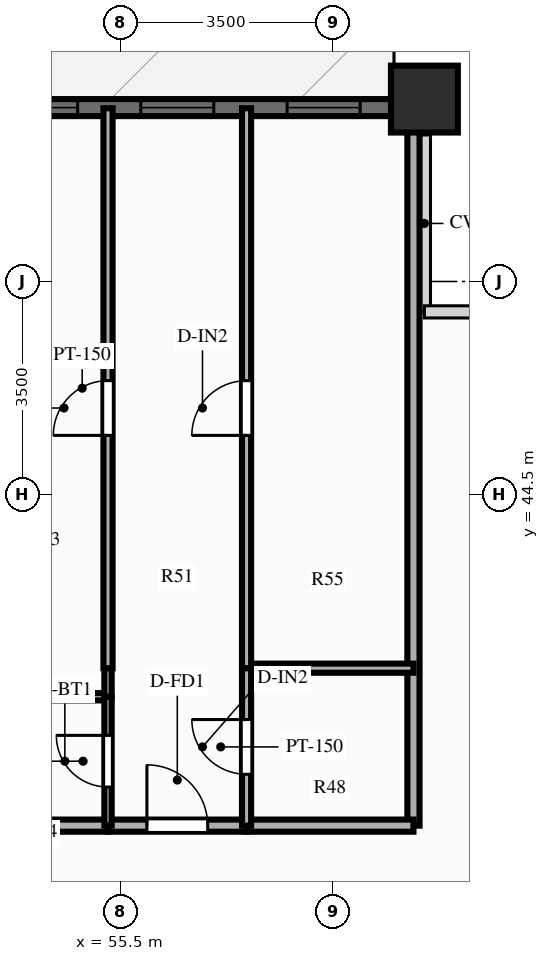
"""IFC4 building model, lengths in metres.
Left out: names, types, materials, properties, quantities, classifications, styles, units other than length and angle.
Written with IfcOpenShell. Run it as: python <this file> out.ifc"""

import sys

from ifc_helpers import new_model, si_unit, direction, frame, frame_2d, origin, origin_2d, place, context, subcontext, project, spatial, rectangle, extrude, source, transform, mapped, element, fill, save


model = new_model("IFC4")
c1 = context("Model", 3, precision=1e-05, world=origin(), true_north=direction((0.0, 1.0)))
c2 = subcontext(c1, "Body", "Model", "MODEL_VIEW")
j1 = project(units=[si_unit("LENGTHUNIT", "METRE"), si_unit("PLANEANGLEUNIT", "RADIAN")], contexts=[c1])
p1 = place(None, origin())
s1 = spatial("IfcSite", under=j1, at=p1, CompositionType="ELEMENT")
p2 = place(p1, origin())
s2 = spatial("IfcBuilding", under=s1, at=p2, CompositionType="ELEMENT")
p3 = place(p2, frame((0.0, 0.0, 25.4)))
s3 = spatial("IfcBuildingStorey", under=s2, at=p3, CompositionType="ELEMENT", Elevation=25.4)
m1 = source(origin(), c2, "Body", "SweptSolid", [
    extrude(rectangle(XDim=1.1, YDim=1.1, at=origin_2d()), origin(), (0.0, 0.0, 1.0), 3.0),
])
p4 = place(p3, frame((60.5, 51.0, 0.0), z_axis=(0.0, 0.0, 1.0), x_axis=(1.0, 0.0, 0.0)))
e1 = element("IfcColumn", 1, at=p4, inside=s3, PredefinedType="COLUMN", context=c2, shape_type="MappedRepresentation", body=[
    mapped(m1, transform((0.0, 0.0, 0.0), scale=1.0)),
])
p5 = place(p3, frame((15.5, 50.86, 0.0), z_axis=(0.0, 0.0, 1.0), x_axis=(1.0, 0.0, 0.0)))
e2 = element("IfcWall", 2, at=p5, inside=s3, PredefinedType="SOLIDWALL", context=c2, shape_type="SweptSolid", body=[
    extrude(rectangle(XDim=45.0, YDim=0.28, at=frame_2d((22.5, 0.0))), origin(), (0.0, 0.0, 1.0), 2.28),
])
p6 = place(p5, frame((0.76, 0.0, 0.25)))
e3 = element("IfcOpeningElement", 3, at=p6, cuts=e2, PredefinedType="OPENING", context=c2, shape_type="SweptSolid", body=[
    extrude(rectangle(XDim=1.2, YDim=1.5, at=frame_2d((0.6, 0.75))), frame((0.0, 0.152, 0.0), z_axis=(0.0, -1.0, 0.0), x_axis=(1.0, 0.0, 0.0)), (0.0, 0.0, 1.0), 0.304),
])
p7 = place(p5, frame((3.494, 0.0, 0.25)))
e4 = element("IfcOpeningElement", 4, at=p7, cuts=e2, PredefinedType="OPENING", context=c2, shape_type="SweptSolid", body=[
    extrude(rectangle(XDim=1.2, YDim=1.5, at=frame_2d((0.6, 0.75))), frame((0.0, 0.152, 0.0), z_axis=(0.0, -1.0, 0.0), x_axis=(1.0, 0.0, 0.0)), (0.0, 0.0, 1.0), 0.304),
])
p8 = place(p5, frame((8.741, 0.0, 0.25)))
e5 = element("IfcOpeningElement", 5, at=p8, cuts=e2, PredefinedType="OPENING", context=c2, shape_type="SweptSolid", body=[
    extrude(rectangle(XDim=1.2, YDim=1.5, at=frame_2d((0.6, 0.75))), frame((0.0, 0.152, 0.0), z_axis=(0.0, -1.0, 0.0), x_axis=(1.0, 0.0, 0.0)), (0.0, 0.0, 1.0), 0.304),
])
p9 = place(p5, frame((13.616, 0.0, 0.25)))
e6 = element("IfcOpeningElement", 6, at=p9, cuts=e2, PredefinedType="OPENING", context=c2, shape_type="SweptSolid", body=[
    extrude(rectangle(XDim=1.2, YDim=1.5, at=frame_2d((0.6, 0.75))), frame((0.0, 0.152, 0.0), z_axis=(0.0, -1.0, 0.0), x_axis=(1.0, 0.0, 0.0)), (0.0, 0.0, 1.0), 0.304),
])
p10 = place(p5, frame((17.146, 0.0, 0.25)))
e7 = element("IfcOpeningElement", 7, at=p10, cuts=e2, PredefinedType="OPENING", context=c2, shape_type="SweptSolid", body=[
    extrude(rectangle(XDim=1.2, YDim=1.5, at=frame_2d((0.6, 0.75))), frame((0.0, 0.152, 0.0), z_axis=(0.0, -1.0, 0.0), x_axis=(1.0, 0.0, 0.0)), (0.0, 0.0, 1.0), 0.304),
])
p11 = place(p5, frame((22.423, 0.0, 0.0)))
e8 = element("IfcOpeningElement", 8, at=p11, cuts=e2, PredefinedType="OPENING", context=c2, shape_type="SweptSolid", body=[
    extrude(rectangle(XDim=1.1, YDim=2.15, at=frame_2d((0.55, 1.075))), frame((0.0, 0.152, 0.0), z_axis=(0.0, -1.0, 0.0), x_axis=(1.0, 0.0, 0.0)), (0.0, 0.0, 1.0), 0.304),
])
p12 = place(p5, frame((27.252, 0.0, 0.25)))
e9 = element("IfcOpeningElement", 9, at=p12, cuts=e2, PredefinedType="OPENING", context=c2, shape_type="SweptSolid", body=[
    extrude(rectangle(XDim=0.95, YDim=1.5, at=frame_2d((0.475, 0.75))), frame((0.0, 0.152, 0.0), z_axis=(0.0, -1.0, 0.0), x_axis=(1.0, 0.0, 0.0)), (0.0, 0.0, 1.0), 0.304),
])
p13 = place(p5, frame((30.873, 0.0, 0.25)))
e10 = element("IfcOpeningElement", 10, at=p13, cuts=e2, PredefinedType="OPENING", context=c2, shape_type="SweptSolid", body=[
    extrude(rectangle(XDim=1.2, YDim=1.5, at=frame_2d((0.6, 0.75))), frame((0.0, 0.152, 0.0), z_axis=(0.0, -1.0, 0.0), x_axis=(1.0, 0.0, 0.0)), (0.0, 0.0, 1.0), 0.304),
])
p14 = place(p5, frame((33.113, 0.0, 0.25)))
e11 = element("IfcOpeningElement", 11, at=p14, cuts=e2, PredefinedType="OPENING", context=c2, shape_type="SweptSolid", body=[
    extrude(rectangle(XDim=1.2, YDim=1.5, at=frame_2d((0.6, 0.75))), frame((0.0, 0.152, 0.0), z_axis=(0.0, -1.0, 0.0), x_axis=(1.0, 0.0, 0.0)), (0.0, 0.0, 1.0), 0.304),
])
p15 = place(p5, frame((35.624, 0.0, 0.25)))
e12 = element("IfcOpeningElement", 12, at=p15, cuts=e2, PredefinedType="OPENING", context=c2, shape_type="SweptSolid", body=[
    extrude(rectangle(XDim=1.2, YDim=1.5, at=frame_2d((0.6, 0.75))), frame((0.0, 0.152, 0.0), z_axis=(0.0, -1.0, 0.0), x_axis=(1.0, 0.0, 0.0)), (0.0, 0.0, 1.0), 0.304),
])
p16 = place(p5, frame((38.097, 0.0, 0.25)))
e13 = element("IfcOpeningElement", 13, at=p16, cuts=e2, PredefinedType="OPENING", context=c2, shape_type="SweptSolid", body=[
    extrude(rectangle(XDim=1.2, YDim=1.5, at=frame_2d((0.6, 0.75))), frame((0.0, 0.152, 0.0), z_axis=(0.0, -1.0, 0.0), x_axis=(1.0, 0.0, 0.0)), (0.0, 0.0, 1.0), 0.304),
])
p17 = place(p5, frame((40.336, 0.0, 0.25)))
e14 = element("IfcOpeningElement", 14, at=p17, cuts=e2, PredefinedType="OPENING", context=c2, shape_type="SweptSolid", body=[
    extrude(rectangle(XDim=1.2, YDim=1.5, at=frame_2d((0.6, 0.75))), frame((0.0, 0.152, 0.0), z_axis=(0.0, -1.0, 0.0), x_axis=(1.0, 0.0, 0.0)), (0.0, 0.0, 1.0), 0.304),
])
p18 = place(p5, frame((42.743, 0.0, 0.25)))
e15 = element("IfcOpeningElement", 15, at=p18, cuts=e2, PredefinedType="OPENING", context=c2, shape_type="SweptSolid", body=[
    extrude(rectangle(XDim=1.2, YDim=1.5, at=frame_2d((0.6, 0.75))), frame((0.0, 0.152, 0.0), z_axis=(0.0, -1.0, 0.0), x_axis=(1.0, 0.0, 0.0)), (0.0, 0.0, 1.0), 0.304),
])
p19 = place(p3, frame((60.32, 39.05, 0.0), z_axis=(0.0, 0.0, 1.0), x_axis=(0.0, 1.0, 0.0)))
e16 = element("IfcWall", 16, at=p19, inside=s3, PredefinedType="PARTITIONING", context=c2, shape_type="SweptSolid", body=[
    extrude(rectangle(XDim=11.8, YDim=0.2, at=frame_2d((5.9, 0.0))), origin(), (0.0, 0.0, 1.0), 2.79),
])
p20 = place(p3, frame((53.097, 39.05, 0.0), z_axis=(0.0, 0.0, 1.0), x_axis=(1.0, 0.0, 0.0)))
e17 = element("IfcWall", 17, at=p20, inside=s3, PredefinedType="PARTITIONING", context=c2, shape_type="SweptSolid", body=[
    extrude(rectangle(XDim=2.2, YDim=0.2, at=frame_2d((1.1, 0.0))), origin(), (0.0, 0.0, 1.0), 2.79),
])
p21 = place(p3, frame((55.297, 39.05, 0.0), z_axis=(0.0, 0.0, 1.0), x_axis=(1.0, 0.0, 0.0)))
e18 = element("IfcWall", 18, at=p21, inside=s3, PredefinedType="PARTITIONING", context=c2, shape_type="SweptSolid", body=[
    extrude(rectangle(XDim=2.279, YDim=0.2, at=frame_2d((1.139, 0.0))), origin(), (0.0, 0.0, 1.0), 2.79),
])
p22 = place(p21, frame((0.639, 0.0, 0.0)))
e19 = element("IfcOpeningElement", 19, at=p22, cuts=e18, PredefinedType="OPENING", context=c2, shape_type="SweptSolid", body=[
    extrude(rectangle(XDim=1.0, YDim=2.15, at=frame_2d((0.5, 1.075))), frame((0.0, 0.112, 0.0), z_axis=(0.0, -1.0, 0.0), x_axis=(1.0, 0.0, 0.0)), (0.0, 0.0, 1.0), 0.224),
])
p23 = place(p3, frame((57.575, 39.05, 0.0), z_axis=(0.0, 0.0, 1.0), x_axis=(1.0, 0.0, 0.0)))
e20 = element("IfcWall", 20, at=p23, inside=s3, PredefinedType="PARTITIONING", context=c2, shape_type="SweptSolid", body=[
    extrude(rectangle(XDim=2.745, YDim=0.2, at=frame_2d((1.373, 0.0))), origin(), (0.0, 0.0, 1.0), 2.79),
])
p24 = place(p3, frame((53.097, 41.17, 0.0), z_axis=(0.0, 0.0, 1.0), x_axis=(1.0, 0.0, 0.0)))
e21 = element("IfcWall", 21, at=p24, inside=s3, PredefinedType="PARTITIONING", context=c2, shape_type="SweptSolid", body=[
    extrude(rectangle(XDim=2.2, YDim=0.12, at=frame_2d((1.1, 0.0))), origin(), (0.0, 0.0, 1.0), 2.79),
])
p25 = place(p3, frame((57.575, 41.64, 0.0), z_axis=(0.0, 0.0, 1.0), x_axis=(1.0, 0.0, 0.0)))
e22 = element("IfcWall", 22, at=p25, inside=s3, PredefinedType="PARTITIONING", context=c2, shape_type="SweptSolid", body=[
    extrude(rectangle(XDim=2.745, YDim=0.15, at=frame_2d((1.373, 0.0))), origin(), (0.0, 0.0, 1.0), 2.79),
])
p26 = place(p3, frame((55.297, 39.05, 0.0), z_axis=(0.0, 0.0, 1.0), x_axis=(0.0, 1.0, 0.0)))
e23 = element("IfcWall", 23, at=p26, inside=s3, PredefinedType="PARTITIONING", context=c2, shape_type="SweptSolid", body=[
    extrude(rectangle(XDim=2.12, YDim=0.12, at=frame_2d((1.06, 0.0))), origin(), (0.0, 0.0, 1.0), 2.79),
])
p27 = place(p26, frame((0.635, 0.0, 0.0)))
e24 = element("IfcOpeningElement", 24, at=p27, cuts=e23, PredefinedType="OPENING", context=c2, shape_type="SweptSolid", body=[
    extrude(rectangle(XDim=0.85, YDim=2.05, at=frame_2d((0.425, 1.025))), frame((0.0, 0.072, 0.0), z_axis=(0.0, -1.0, 0.0), x_axis=(1.0, 0.0, 0.0)), (0.0, 0.0, 1.0), 0.144),
])
p28 = place(p3, frame((55.297, 41.17, 0.0), z_axis=(0.0, 0.0, 1.0), x_axis=(0.0, 1.0, 0.0)))
e25 = element("IfcWall", 25, at=p28, inside=s3, PredefinedType="PARTITIONING", context=c2, shape_type="SweptSolid", body=[
    extrude(rectangle(XDim=0.47, YDim=0.12, at=frame_2d((0.235, 0.0))), origin(), (0.0, 0.0, 1.0), 2.79),
])
p29 = place(p3, frame((55.297, 41.64, 0.0), z_axis=(0.0, 0.0, 1.0), x_axis=(0.0, 1.0, 0.0)))
e26 = element("IfcWall", 26, at=p29, inside=s3, PredefinedType="PARTITIONING", context=c2, shape_type="SweptSolid", body=[
    extrude(rectangle(XDim=9.21, YDim=0.15, at=frame_2d((4.605, 0.0))), origin(), (0.0, 0.0, 1.0), 2.79),
])
p30 = place(p29, frame((3.829, 0.0, 0.0)))
e27 = element("IfcOpeningElement", 27, at=p30, cuts=e26, PredefinedType="OPENING", context=c2, shape_type="SweptSolid", body=[
    extrude(rectangle(XDim=0.9, YDim=2.1, at=frame_2d((0.45, 1.05))), frame((0.0, 0.087, 0.0), z_axis=(0.0, -1.0, 0.0), x_axis=(1.0, 0.0, 0.0)), (0.0, 0.0, 1.0), 0.174),
])
p31 = place(p3, frame((57.575, 39.05, 0.0), z_axis=(0.0, 0.0, 1.0), x_axis=(0.0, 1.0, 0.0)))
e28 = element("IfcWall", 28, at=p31, inside=s3, PredefinedType="PARTITIONING", context=c2, shape_type="SweptSolid", body=[
    extrude(rectangle(XDim=2.59, YDim=0.15, at=frame_2d((1.295, 0.0))), origin(), (0.0, 0.0, 1.0), 2.79),
])
p32 = place(p31, frame((0.845, 0.0, 0.0)))
e29 = element("IfcOpeningElement", 29, at=p32, cuts=e28, PredefinedType="OPENING", context=c2, shape_type="SweptSolid", body=[
    extrude(rectangle(XDim=0.9, YDim=2.1, at=frame_2d((0.45, 1.05))), frame((0.0, 0.087, 0.0), z_axis=(0.0, -1.0, 0.0), x_axis=(1.0, 0.0, 0.0)), (0.0, 0.0, 1.0), 0.174),
])
p33 = place(p3, frame((57.575, 41.64, 0.0), z_axis=(0.0, 0.0, 1.0), x_axis=(0.0, 1.0, 0.0)))
e30 = element("IfcWall", 30, at=p33, inside=s3, PredefinedType="PARTITIONING", context=c2, shape_type="SweptSolid", body=[
    extrude(rectangle(XDim=9.21, YDim=0.15, at=frame_2d((4.605, 0.0))), origin(), (0.0, 0.0, 1.0), 2.79),
])
p34 = place(p33, frame((3.829, 0.0, 0.0)))
e31 = element("IfcOpeningElement", 31, at=p34, cuts=e30, PredefinedType="OPENING", context=c2, shape_type="SweptSolid", body=[
    extrude(rectangle(XDim=0.9, YDim=2.1, at=frame_2d((0.45, 1.05))), frame((0.0, 0.087, 0.0), z_axis=(0.0, -1.0, 0.0), x_axis=(1.0, 0.0, 0.0)), (0.0, 0.0, 1.0), 0.174),
])
m2 = source(origin(), c2, "Body", "SweptSolid", [
    extrude(rectangle(XDim=1.2, YDim=1.5, at=frame_2d((0.6, 0.75))), frame((0.0, 0.03, 0.0), z_axis=(0.0, -1.0, 0.0), x_axis=(1.0, 0.0, 0.0)), (0.0, 0.0, 1.0), 0.06),
])
p35 = place(p16, origin())
e32 = element("IfcWindow", 32, at=p35, inside=s3, PartitioningType="SINGLE_PANEL", PredefinedType="WINDOW", context=c2, shape_type="MappedRepresentation", body=[
    mapped(m2, transform((0.0, 0.0, 0.0), scale=1.0)),
])
fill(e13, e32)
p36 = place(p17, origin())
e33 = element("IfcWindow", 33, at=p36, inside=s3, PartitioningType="SINGLE_PANEL", PredefinedType="WINDOW", context=c2, shape_type="MappedRepresentation", body=[
    mapped(m2, transform((0.0, 0.0, 0.0), scale=1.0)),
])
fill(e14, e33)
p37 = place(p18, origin())
e34 = element("IfcWindow", 34, at=p37, inside=s3, PartitioningType="SINGLE_PANEL", PredefinedType="WINDOW", context=c2, shape_type="MappedRepresentation", body=[
    mapped(m2, transform((0.0, 0.0, 0.0), scale=1.0)),
])
fill(e15, e34)
m3 = source(origin(), c2, "Body", "SweptSolid", [
    extrude(rectangle(XDim=1.0, YDim=2.15, at=frame_2d((0.5, 1.075))), frame((0.0, 0.025, 0.0), z_axis=(0.0, -1.0, 0.0), x_axis=(1.0, 0.0, 0.0)), (0.0, 0.0, 1.0), 0.05),
])
p38 = place(p22, origin())
e35 = element("IfcDoor", 35, at=p38, inside=s3, OperationType="SINGLE_SWING_LEFT", PredefinedType="DOOR", context=c2, shape_type="MappedRepresentation", body=[
    mapped(m3, transform((0.0, 0.0, 0.0), scale=1.0)),
])
fill(e19, e35)
m4 = source(origin(), c2, "Body", "SweptSolid", [
    extrude(rectangle(XDim=0.85, YDim=2.05, at=frame_2d((0.425, 1.025))), frame((0.0, 0.025, 0.0), z_axis=(0.0, -1.0, 0.0), x_axis=(1.0, 0.0, 0.0)), (0.0, 0.0, 1.0), 0.05),
])
p39 = place(p27, origin())
e36 = element("IfcDoor", 36, at=p39, inside=s3, OperationType="SINGLE_SWING_RIGHT", PredefinedType="DOOR", context=c2, shape_type="MappedRepresentation", body=[
    mapped(m4, transform((0.0, 0.0, 0.0), scale=1.0)),
])
fill(e24, e36)
m5 = source(origin(), c2, "Body", "SweptSolid", [
    extrude(rectangle(XDim=0.9, YDim=2.1, at=frame_2d((0.45, 1.05))), frame((0.0, 0.025, 0.0), z_axis=(0.0, -1.0, 0.0), x_axis=(1.0, 0.0, 0.0)), (0.0, 0.0, 1.0), 0.05),
])
p40 = place(p30, origin())
e37 = element("IfcDoor", 37, at=p40, inside=s3, OperationType="SINGLE_SWING_LEFT", PredefinedType="DOOR", context=c2, shape_type="MappedRepresentation", body=[
    mapped(m5, transform((0.0, 0.0, 0.0), scale=1.0)),
])
fill(e27, e37)
p41 = place(p32, origin())
e38 = element("IfcDoor", 38, at=p41, inside=s3, OperationType="SINGLE_SWING_RIGHT", PredefinedType="DOOR", context=c2, shape_type="MappedRepresentation", body=[
    mapped(m5, transform((0.0, 0.0, 0.0), scale=1.0)),
])
fill(e29, e38)
p42 = place(p34, origin())
e39 = element("IfcDoor", 39, at=p42, inside=s3, OperationType="SINGLE_SWING_LEFT", PredefinedType="DOOR", context=c2, shape_type="MappedRepresentation", body=[
    mapped(m5, transform((0.0, 0.0, 0.0), scale=1.0)),
])
fill(e31, e39)
save(model, sys.argv[1])
